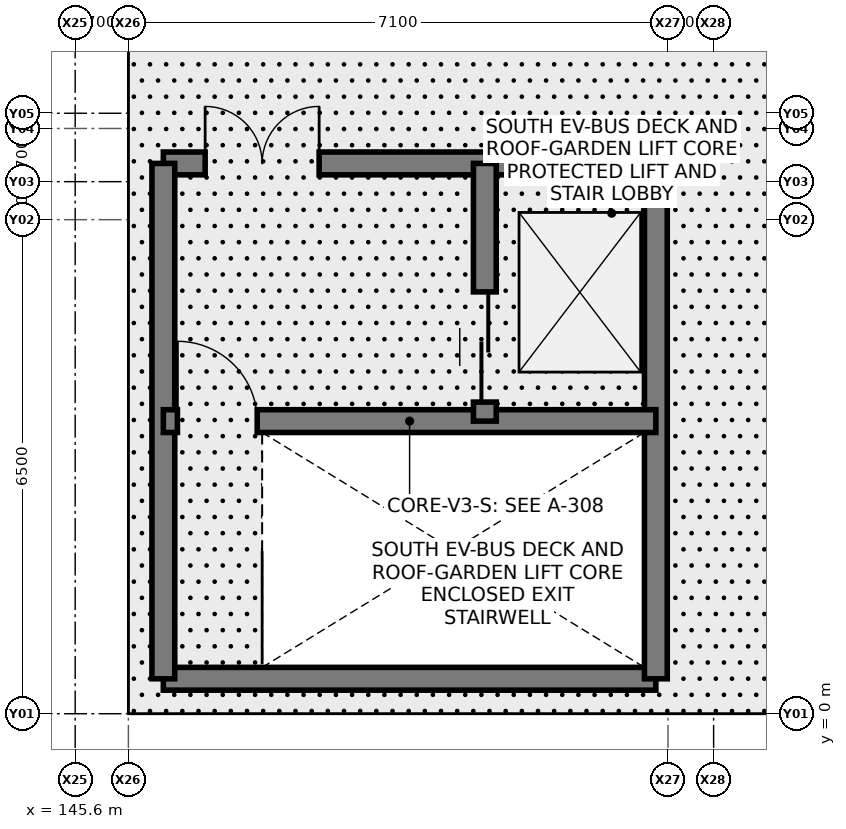
"""IFC4 building model, lengths in metres.
Left out: names, types, materials, properties, quantities, classifications, styles, units other than length and angle.
Written with IfcOpenShell. Run it as: python <this file> out.ifc"""

import sys

from ifc_helpers import new_model, si_unit, direction, frame, frame_2d, origin, place, context, subcontext, project, spatial, rectangle, extrude, element, fill, save


model = new_model("IFC4")
c1 = context("Model", 3, precision=1e-05, world=origin(), true_north=direction((0.0, 1.0)))
c2 = subcontext(c1, "Body", "Model", "MODEL_VIEW")
j1 = project(units=[si_unit("LENGTHUNIT", "METRE"), si_unit("PLANEANGLEUNIT", "RADIAN")], contexts=[c1])
p1 = place(None, origin())
s1 = spatial("IfcSite", under=j1, at=p1, CompositionType="ELEMENT")
p2 = place(p1, origin())
s2 = spatial("IfcBuilding", under=s1, at=p2, CompositionType="ELEMENT")
p3 = place(p2, frame((0.0, 0.0, 11.1)))
s3 = spatial("IfcBuildingStorey", under=s2, at=p3, CompositionType="ELEMENT", Elevation=11.1)
p4 = place(p3, frame((146.76, 0.46, 0.0), z_axis=(0.0, 0.0, 1.0), x_axis=(1.0, 0.0, 0.0)))
e1 = element("IfcWall", 1, at=p4, inside=s3, PredefinedType="SHEAR", context=c2, shape_type="SweptSolid", body=[
    extrude(rectangle(XDim=6.48, YDim=0.3, at=frame_2d((3.24, 0.0))), origin(), (0.0, 0.0, 1.0), 3.92),
])
p5 = place(p3, frame((146.76, 7.24, 0.0), z_axis=(0.0, 0.0, 1.0), x_axis=(1.0, 0.0, 0.0)))
e2 = element("IfcWall", 2, at=p5, inside=s3, PredefinedType="SHEAR", context=c2, shape_type="SweptSolid", body=[
    extrude(rectangle(XDim=6.48, YDim=0.3, at=frame_2d((3.24, 0.0))), origin(), (0.0, 0.0, 1.0), 3.92),
])
p6 = place(p5, frame((0.55, 0.0, 0.0)))
e3 = element("IfcOpeningElement", 3, at=p6, cuts=e2, PredefinedType="OPENING", context=c2, shape_type="SweptSolid", body=[
    extrude(rectangle(XDim=1.5, YDim=2.2, at=frame_2d((0.75, 1.1))), frame((0.0, 0.16, 0.0), z_axis=(0.0, -1.0, 0.0), x_axis=(1.0, 0.0, 0.0)), (0.0, 0.0, 1.0), 0.32),
])
for number, where, z_axis, x_axis in (
    (4, (146.76, 0.46, 0.0), (0.0, 0.0, 1.0), (0.0, 1.0, 0.0)),
    (5, (153.24, 0.46, 0.0), (0.0, 0.0, 1.0), (0.0, 1.0, 0.0)),
):
    element("IfcWall", number, at=place(p3, frame(where, z_axis=z_axis, x_axis=x_axis)), inside=s3, PredefinedType="SHEAR", context=c2, shape_type="SweptSolid", body=[
        extrude(rectangle(XDim=6.78, YDim=0.3, at=frame_2d((3.39, 0.0))), origin(), (0.0, 0.0, 1.0), 3.92),
    ])
p7 = place(p3, frame((146.76, 3.85, 0.0), z_axis=(0.0, 0.0, 1.0), x_axis=(1.0, 0.0, 0.0)))
e6 = element("IfcWall", 6, at=p7, inside=s3, PredefinedType="SHEAR", context=c2, shape_type="SweptSolid", body=[
    extrude(rectangle(XDim=6.48, YDim=0.3, at=frame_2d((3.24, 0.0))), origin(), (0.0, 0.0, 1.0), 3.92),
])
p8 = place(p7, frame((0.185, 0.0, 0.0)))
e7 = element("IfcOpeningElement", 7, at=p8, cuts=e6, PredefinedType="OPENING", context=c2, shape_type="SweptSolid", body=[
    extrude(rectangle(XDim=1.05, YDim=2.15, at=frame_2d((0.525, 1.075))), frame((0.0, 0.16, 0.0), z_axis=(0.0, -1.0, 0.0), x_axis=(1.0, 0.0, 0.0)), (0.0, 0.0, 1.0), 0.32),
])
p9 = place(p3, frame((150.99, 3.85, 0.0), z_axis=(0.0, 0.0, 1.0), x_axis=(0.0, 1.0, 0.0)))
e8 = element("IfcWall", 8, at=p9, inside=s3, PredefinedType="SHEAR", context=c2, shape_type="SweptSolid", body=[
    extrude(rectangle(XDim=3.39, YDim=0.3, at=frame_2d((1.695, 0.0))), origin(), (0.0, 0.0, 1.0), 3.92),
])
p10 = place(p9, frame((0.25, 0.0, 0.0)))
e9 = element("IfcOpeningElement", 9, at=p10, cuts=e8, PredefinedType="OPENING", context=c2, shape_type="SweptSolid", body=[
    extrude(rectangle(XDim=1.45, YDim=2.25, at=frame_2d((0.725, 1.125))), frame((0.0, 0.16, 0.0), z_axis=(0.0, -1.0, 0.0), x_axis=(1.0, 0.0, 0.0)), (0.0, 0.0, 1.0), 0.32),
])
p11 = place(p8, origin())
e10 = element("IfcDoor", 10, at=p11, inside=s3, OperationType="SINGLE_SWING_LEFT", PredefinedType="DOOR", context=c2, shape_type="SweptSolid", body=[
    extrude(rectangle(XDim=1.05, YDim=2.15, at=frame_2d((0.525, 1.075))), frame((0.0, 0.025, 0.0), z_axis=(0.0, -1.0, 0.0), x_axis=(1.0, 0.0, 0.0)), (0.0, 0.0, 1.0), 0.05),
])
fill(e7, e10)
p12 = place(p6, origin())
e11 = element("IfcDoor", 11, at=p12, inside=s3, OperationType="DOUBLE_DOOR_SINGLE_SWING", PredefinedType="DOOR", context=c2, shape_type="SweptSolid", body=[
    extrude(rectangle(XDim=1.5, YDim=2.2, at=frame_2d((0.75, 1.1))), frame((0.0, 0.025, 0.0), z_axis=(0.0, -1.0, 0.0), x_axis=(1.0, 0.0, 0.0)), (0.0, 0.0, 1.0), 0.05),
])
fill(e3, e11)
p13 = place(p10, origin())
e12 = element("IfcDoor", 12, at=p13, inside=s3, OperationType="SLIDING_TO_RIGHT", PredefinedType="DOOR", context=c2, shape_type="SweptSolid", body=[
    extrude(rectangle(XDim=1.45, YDim=2.25, at=frame_2d((0.725, 1.125))), frame((0.0, 0.025, 0.0), z_axis=(0.0, -1.0, 0.0), x_axis=(1.0, 0.0, 0.0)), (0.0, 0.0, 1.0), 0.05),
])
fill(e9, e12)
save(model, sys.argv[1])
